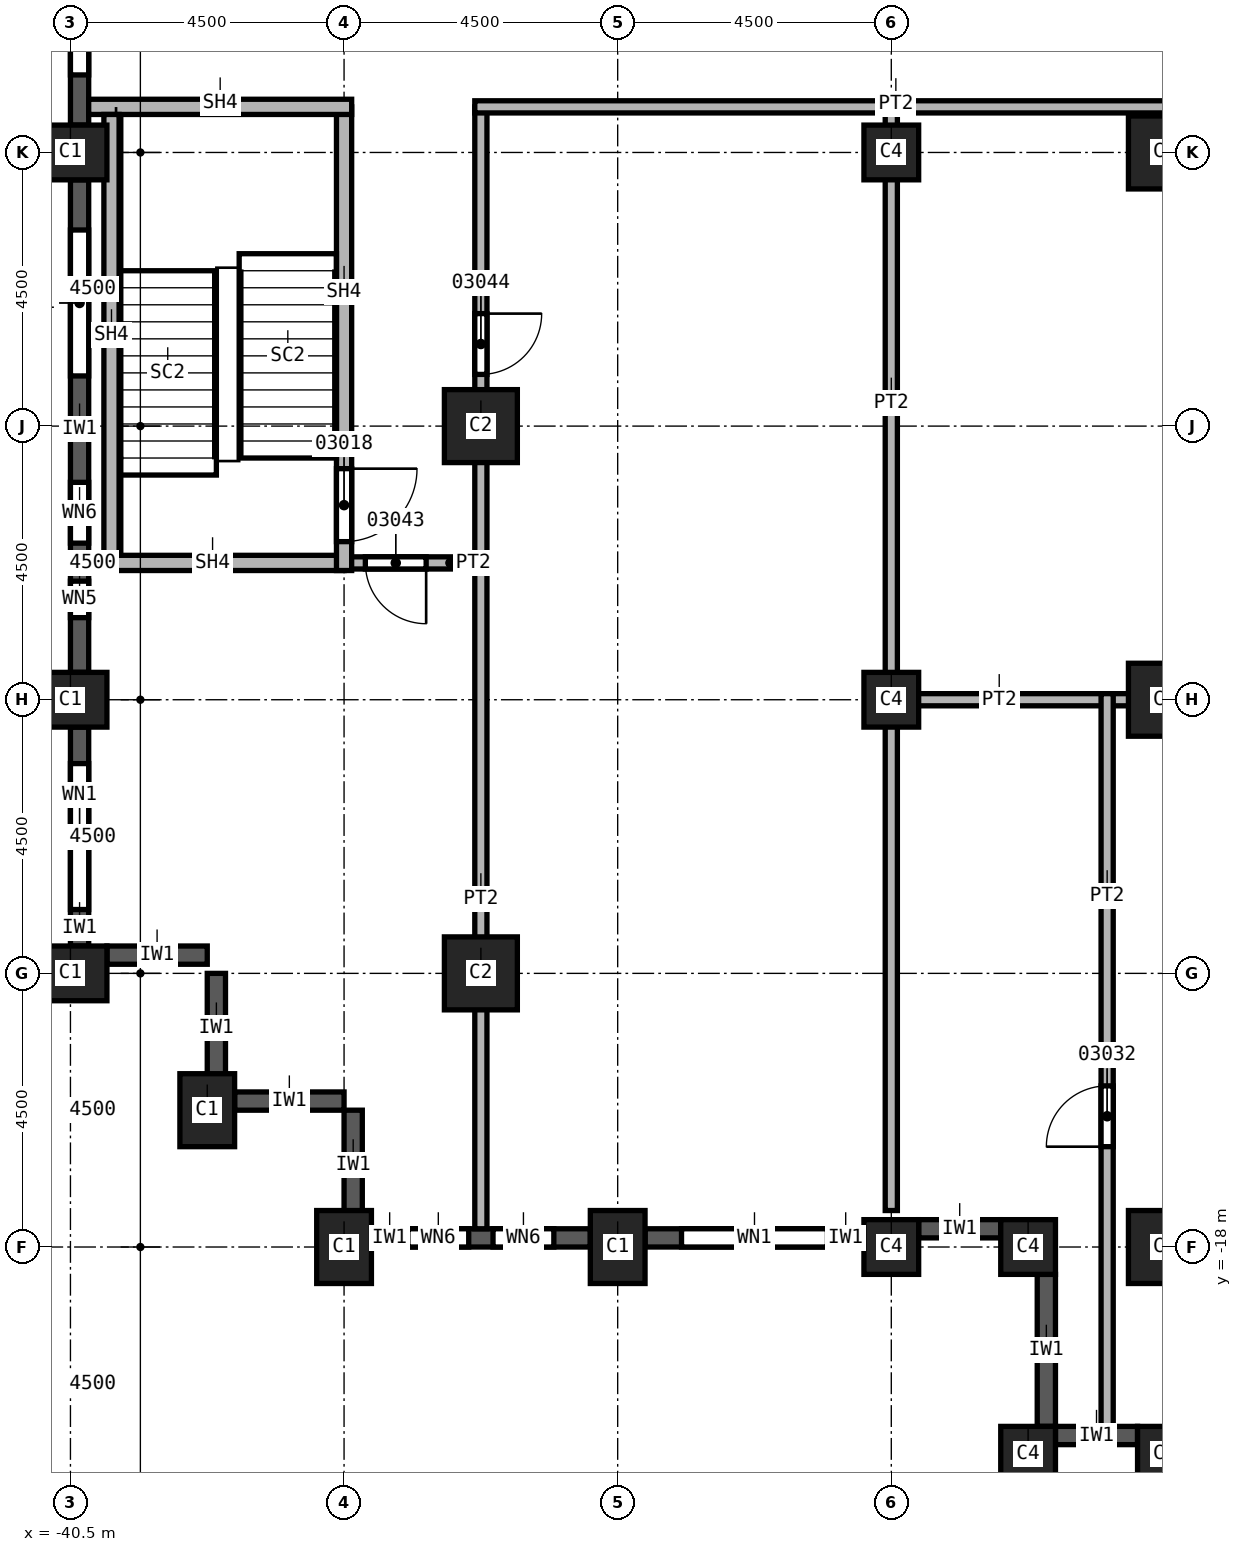
"""IFC4 building model, lengths in metres.
Left out: names, types, materials, properties, quantities, classifications, styles, units other than length and angle.
Written with IfcOpenShell. Run it as: python <this file> out.ifc"""

import sys

from ifc_helpers import new_model, si_unit, direction, frame, frame_2d, origin, origin_2d, place, context, subcontext, project, spatial, rectangle, extrude, element, fill, save


model = new_model("IFC4")
c1 = context("Model", 3, precision=1e-05, world=origin(), true_north=direction((0.0, 1.0)))
c2 = subcontext(c1, "Body", "Model", "MODEL_VIEW")
j1 = project(units=[si_unit("LENGTHUNIT", "METRE"), si_unit("PLANEANGLEUNIT", "RADIAN")], contexts=[c1])
p1 = place(None, origin())
s1 = spatial("IfcSite", under=j1, at=p1, CompositionType="ELEMENT")
p2 = place(p1, origin())
s2 = spatial("IfcBuilding", under=s1, at=p2, CompositionType="ELEMENT")
p3 = place(p2, frame((0.0, 0.0, 92.0)))
s3 = spatial("IfcBuildingStorey", under=s2, at=p3, CompositionType="ELEMENT", Elevation=92.0)
for number, where, z_axis, x_axis in (
    (1, (-40.5, 0.0, 0.0), (0.0, 0.0, 1.0), (0.0, 1.0, 0.0)),
    (2, (-40.5, -9.0, 0.0), (0.0, 0.0, 1.0), (0.0, 1.0, 0.0)),
    (3, (-40.5, -13.5, 0.0), (0.0, 0.0, 1.0), (0.0, 1.0, 0.0)),
    (4, (-38.25, -15.75, 0.0), (0.0, 0.0, 1.0), (1.0, 0.0, 0.0)),
    (5, (-31.5, -18.0, 0.0), (0.0, 0.0, 1.0), (1.0, 0.0, 0.0)),
    (6, (-36.0, -18.0, 0.0), (0.0, 0.0, 1.0), (1.0, 0.0, 0.0)),
):
    element("IfcColumn", number, at=place(p3, frame(where, z_axis=z_axis, x_axis=x_axis)), inside=s3, PredefinedType="COLUMN", context=c2, shape_type="SweptSolid", body=[
        extrude(rectangle(XDim=0.9, YDim=1.2, at=origin_2d()), origin(), (0.0, 0.0, 1.0), 3.7),
    ])
for number, where, z_axis, x_axis in (
    (7, (-33.75, -4.5, 0.0), (0.0, 0.0, 1.0), (1.0, 0.0, 0.0)),
    (8, (-33.75, -13.5, 0.0), (0.0, 0.0, 1.0), (1.0, 0.0, 0.0)),
    (9, (-22.5, 0.0, 0.0), (0.0, 0.0, 1.0), (1.0, 0.0, 0.0)),
    (10, (-22.5, -9.0, 0.0), (0.0, 0.0, 1.0), (1.0, 0.0, 0.0)),
    (11, (-22.5, -18.0, 0.0), (0.0, 0.0, 1.0), (1.0, 0.0, 0.0)),
):
    element("IfcColumn", number, at=place(p3, frame(where, z_axis=z_axis, x_axis=x_axis)), inside=s3, PredefinedType="COLUMN", context=c2, shape_type="SweptSolid", body=[
        extrude(rectangle(XDim=1.2, YDim=1.2, at=origin_2d()), origin(), (0.0, 0.0, 1.0), 3.7),
    ])
for number, where, z_axis, x_axis in (
    (12, (-27.0, 0.0, 0.0), (0.0, 0.0, 1.0), (1.0, 0.0, 0.0)),
    (13, (-27.0, -9.0, 0.0), (0.0, 0.0, 1.0), (1.0, 0.0, 0.0)),
    (14, (-27.0, -18.0, 0.0), (0.0, 0.0, 1.0), (1.0, 0.0, 0.0)),
    (15, (-22.5, -21.4, 0.0), (0.0, 0.0, 1.0), (1.0, 0.0, 0.0)),
    (16, (-24.75, -21.4, 0.0), (0.0, 0.0, 1.0), (1.0, 0.0, 0.0)),
    (17, (-24.75, -18.0, 0.0), (0.0, 0.0, 1.0), (1.0, 0.0, 0.0)),
):
    element("IfcColumn", number, at=place(p3, frame(where, z_axis=z_axis, x_axis=x_axis)), inside=s3, PredefinedType="COLUMN", context=c2, shape_type="SweptSolid", body=[
        extrude(rectangle(XDim=0.9, YDim=0.9, at=origin_2d()), origin(), (0.0, 0.0, 1.0), 3.7),
    ])
p4 = place(p3, frame((-39.9, -13.2, 0.0), z_axis=(0.0, 0.0, 1.0), x_axis=(1.0, 0.0, 0.0)))
e18 = element("IfcWall", 18, at=p4, inside=s3, PredefinedType="SOLIDWALL", context=c2, shape_type="SweptSolid", body=[
    extrude(rectangle(XDim=1.65, YDim=0.3, at=frame_2d((0.825, 0.0))), origin(), (0.0, 0.0, 1.0), 3.1),
])
for number, where, z_axis, x_axis in (
    (19, (-38.1, -15.3, 0.0), (0.0, 0.0, 1.0), (0.0, 1.0, 0.0)),
    (20, (-37.8, -15.6, 0.0), (0.0, 0.0, 1.0), (1.0, 0.0, 0.0)),
    (21, (-35.85, -17.55, 0.0), (0.0, 0.0, 1.0), (0.0, 1.0, 0.0)),
):
    element("IfcWall", number, at=place(p3, frame(where, z_axis=z_axis, x_axis=x_axis)), inside=s3, PredefinedType="SOLIDWALL", context=c2, shape_type="SweptSolid", body=[
        extrude(rectangle(XDim=1.8, YDim=0.3, at=frame_2d((0.9, 0.0))), origin(), (0.0, 0.0, 1.0), 3.1),
    ])
p5 = place(p3, frame((-40.35, 8.55, 0.0), z_axis=(0.0, 0.0, 1.0), x_axis=(0.0, -1.0, 0.0)))
e22 = element("IfcWall", 22, at=p5, inside=s3, PredefinedType="SOLIDWALL", context=c2, shape_type="SweptSolid", body=[
    extrude(rectangle(XDim=8.1, YDim=0.3, at=frame_2d((4.05, 0.0))), origin(), (0.0, 0.0, 1.0), 3.1),
])
p6 = place(p5, frame((0.825, 0.0, 0.8)))
e23 = element("IfcOpeningElement", 23, at=p6, cuts=e22, PredefinedType="OPENING", context=c2, shape_type="SweptSolid", body=[
    extrude(rectangle(XDim=2.4, YDim=1.95, at=frame_2d((1.2, 0.975))), frame((0.0, 0.15, 0.0), z_axis=(0.0, -1.0, 0.0), x_axis=(1.0, 0.0, 0.0)), (0.0, 0.0, 1.0), 0.3),
])
p7 = place(p5, frame((4.875, 0.0, 0.8)))
e24 = element("IfcOpeningElement", 24, at=p7, cuts=e22, PredefinedType="OPENING", context=c2, shape_type="SweptSolid", body=[
    extrude(rectangle(XDim=2.4, YDim=1.95, at=frame_2d((1.2, 0.975))), frame((0.0, 0.15, 0.0), z_axis=(0.0, -1.0, 0.0), x_axis=(1.0, 0.0, 0.0)), (0.0, 0.0, 1.0), 0.3),
])
p8 = place(p3, frame((-40.35, -0.45, 0.0), z_axis=(0.0, 0.0, 1.0), x_axis=(0.0, -1.0, 0.0)))
e25 = element("IfcWall", 25, at=p8, inside=s3, PredefinedType="SOLIDWALL", context=c2, shape_type="SweptSolid", body=[
    extrude(rectangle(XDim=8.1, YDim=0.3, at=frame_2d((4.05, 0.0))), origin(), (0.0, 0.0, 1.0), 3.1),
])
p9 = place(p8, frame((0.825, 0.0, 0.8)))
e26 = element("IfcOpeningElement", 26, at=p9, cuts=e25, PredefinedType="OPENING", context=c2, shape_type="SweptSolid", body=[
    extrude(rectangle(XDim=2.4, YDim=1.95, at=frame_2d((1.2, 0.975))), frame((0.0, 0.15, 0.0), z_axis=(0.0, -1.0, 0.0), x_axis=(1.0, 0.0, 0.0)), (0.0, 0.0, 1.0), 0.3),
])
p10 = place(p8, frame((4.975, 0.0, 0.8)))
e27 = element("IfcOpeningElement", 27, at=p10, cuts=e25, PredefinedType="OPENING", context=c2, shape_type="SweptSolid", body=[
    extrude(rectangle(XDim=1.0, YDim=1.95, at=frame_2d((0.5, 0.975))), frame((0.0, 0.15, 0.0), z_axis=(0.0, -1.0, 0.0), x_axis=(1.0, 0.0, 0.0)), (0.0, 0.0, 1.0), 0.3),
])
p11 = place(p8, frame((6.6, 0.0, 0.8)))
e28 = element("IfcOpeningElement", 28, at=p11, cuts=e25, PredefinedType="OPENING", context=c2, shape_type="SweptSolid", body=[
    extrude(rectangle(XDim=0.6, YDim=1.95, at=frame_2d((0.3, 0.975))), frame((0.0, 0.15, 0.0), z_axis=(0.0, -1.0, 0.0), x_axis=(1.0, 0.0, 0.0)), (0.0, 0.0, 1.0), 0.3),
])
p12 = place(p3, frame((-40.35, -9.45, 0.0), z_axis=(0.0, 0.0, 1.0), x_axis=(0.0, -1.0, 0.0)))
e29 = element("IfcWall", 29, at=p12, inside=s3, PredefinedType="SOLIDWALL", context=c2, shape_type="SweptSolid", body=[
    extrude(rectangle(XDim=3.6, YDim=0.3, at=frame_2d((1.8, 0.0))), origin(), (0.0, 0.0, 1.0), 3.1),
])
p13 = place(p12, frame((0.6, 0.0, 0.8)))
e30 = element("IfcOpeningElement", 30, at=p13, cuts=e29, PredefinedType="OPENING", context=c2, shape_type="SweptSolid", body=[
    extrude(rectangle(XDim=2.4, YDim=1.95, at=frame_2d((1.2, 0.975))), frame((0.0, 0.15, 0.0), z_axis=(0.0, -1.0, 0.0), x_axis=(1.0, 0.0, 0.0)), (0.0, 0.0, 1.0), 0.3),
])
p14 = place(p3, frame((-35.55, -17.85, 0.0), z_axis=(0.0, 0.0, 1.0), x_axis=(1.0, 0.0, 0.0)))
e31 = element("IfcWall", 31, at=p14, inside=s3, PredefinedType="SOLIDWALL", context=c2, shape_type="SweptSolid", body=[
    extrude(rectangle(XDim=3.6, YDim=0.3, at=frame_2d((1.8, 0.0))), origin(), (0.0, 0.0, 1.0), 3.1),
])
p15 = place(p14, frame((0.6, 0.0, 0.8)))
e32 = element("IfcOpeningElement", 32, at=p15, cuts=e31, PredefinedType="OPENING", context=c2, shape_type="SweptSolid", body=[
    extrude(rectangle(XDim=1.0, YDim=1.95, at=frame_2d((0.5, 0.975))), frame((0.0, 0.15, 0.0), z_axis=(0.0, -1.0, 0.0), x_axis=(1.0, 0.0, 0.0)), (0.0, 0.0, 1.0), 0.3),
])
p16 = place(p14, frame((2.0, 0.0, 0.8)))
e33 = element("IfcOpeningElement", 33, at=p16, cuts=e31, PredefinedType="OPENING", context=c2, shape_type="SweptSolid", body=[
    extrude(rectangle(XDim=1.0, YDim=1.95, at=frame_2d((0.5, 0.975))), frame((0.0, 0.15, 0.0), z_axis=(0.0, -1.0, 0.0), x_axis=(1.0, 0.0, 0.0)), (0.0, 0.0, 1.0), 0.3),
])
p17 = place(p3, frame((-31.05, -17.85, 0.0), z_axis=(0.0, 0.0, 1.0), x_axis=(1.0, 0.0, 0.0)))
e34 = element("IfcWall", 34, at=p17, inside=s3, PredefinedType="SOLIDWALL", context=c2, shape_type="SweptSolid", body=[
    extrude(rectangle(XDim=3.6, YDim=0.3, at=frame_2d((1.8, 0.0))), origin(), (0.0, 0.0, 1.0), 3.1),
])
p18 = place(p17, frame((0.6, 0.0, 0.8)))
e35 = element("IfcOpeningElement", 35, at=p18, cuts=e34, PredefinedType="OPENING", context=c2, shape_type="SweptSolid", body=[
    extrude(rectangle(XDim=2.4, YDim=1.95, at=frame_2d((1.2, 0.975))), frame((0.0, 0.15, 0.0), z_axis=(0.0, -1.0, 0.0), x_axis=(1.0, 0.0, 0.0)), (0.0, 0.0, 1.0), 0.3),
])
p19 = place(p3, frame((-26.55, -17.7, 0.0), z_axis=(0.0, 0.0, 1.0), x_axis=(1.0, 0.0, 0.0)))
e36 = element("IfcWall", 36, at=p19, inside=s3, PredefinedType="SOLIDWALL", context=c2, shape_type="SweptSolid", body=[
    extrude(rectangle(XDim=1.35, YDim=0.3, at=frame_2d((0.675, 0.0))), origin(), (0.0, 0.0, 1.0), 3.1),
])
p20 = place(p3, frame((-24.45, -18.45, 0.0), z_axis=(0.0, 0.0, 1.0), x_axis=(0.0, -1.0, 0.0)))
e37 = element("IfcWall", 37, at=p20, inside=s3, PredefinedType="SOLIDWALL", context=c2, shape_type="SweptSolid", body=[
    extrude(rectangle(XDim=2.5, YDim=0.3, at=frame_2d((1.25, 0.0))), origin(), (0.0, 0.0, 1.0), 3.1),
])
p21 = place(p3, frame((-24.3, -21.1, 0.0), z_axis=(0.0, 0.0, 1.0), x_axis=(1.0, 0.0, 0.0)))
e38 = element("IfcWall", 38, at=p21, inside=s3, PredefinedType="SOLIDWALL", context=c2, shape_type="SweptSolid", body=[
    extrude(rectangle(XDim=1.35, YDim=0.3, at=frame_2d((0.675, 0.0))), origin(), (0.0, 0.0, 1.0), 3.1),
])
p22 = place(p3, frame((-33.75, 0.75, 0.0), z_axis=(0.0, 0.0, 1.0), x_axis=(0.0, -1.0, 0.0)))
e39 = element("IfcWall", 39, at=p22, inside=s3, PredefinedType="PARTITIONING", context=c2, shape_type="SweptSolid", body=[
    extrude(rectangle(XDim=18.45, YDim=0.2, at=frame_2d((9.225, 0.0))), origin(), (0.0, 0.0, 1.0), 3.7),
])
p23 = place(p22, frame((3.4, 0.0, 0.0)))
e40 = element("IfcOpeningElement", 40, at=p23, cuts=e39, PredefinedType="OPENING", context=c2, shape_type="SweptSolid", body=[
    extrude(rectangle(XDim=1.0, YDim=2.1, at=frame_2d((0.5, 1.05))), frame((0.0, 0.1, 0.0), z_axis=(0.0, -1.0, 0.0), x_axis=(1.0, 0.0, 0.0)), (0.0, 0.0, 1.0), 0.2),
])
p24 = place(p3, frame((-33.65, -6.75, 0.0), z_axis=(0.0, 0.0, 1.0), x_axis=(-1.0, 0.0, 0.0)))
e41 = element("IfcWall", 41, at=p24, inside=s3, PredefinedType="PARTITIONING", context=c2, shape_type="SweptSolid", body=[
    extrude(rectangle(XDim=2.35, YDim=0.2, at=frame_2d((1.175, 0.0))), origin(), (0.0, 0.0, 1.0), 3.7),
])
p25 = place(p24, frame((1.0, 0.0, 0.0)))
e42 = element("IfcOpeningElement", 42, at=p25, cuts=e41, PredefinedType="OPENING", context=c2, shape_type="SweptSolid", body=[
    extrude(rectangle(XDim=1.0, YDim=2.1, at=frame_2d((0.5, 1.05))), frame((0.0, 0.1, 0.0), z_axis=(0.0, -1.0, 0.0), x_axis=(1.0, 0.0, 0.0)), (0.0, 0.0, 1.0), 0.2),
])
p26 = place(p3, frame((-27.1, -9.0, 0.0), z_axis=(0.0, 0.0, 1.0), x_axis=(1.0, 0.0, 0.0)))
e43 = element("IfcWall", 43, at=p26, inside=s3, PredefinedType="PARTITIONING", context=c2, shape_type="SweptSolid", body=[
    extrude(rectangle(XDim=7.2, YDim=0.2, at=frame_2d((3.6, 0.0))), origin(), (0.0, 0.0, 1.0), 3.7),
])
p27 = place(p3, frame((-27.0, -17.4, 0.0), z_axis=(0.0, 0.0, 1.0), x_axis=(0.0, 1.0, 0.0)))
e44 = element("IfcWall", 44, at=p27, inside=s3, PredefinedType="PARTITIONING", context=c2, shape_type="SweptSolid", body=[
    extrude(rectangle(XDim=18.15, YDim=0.2, at=frame_2d((9.075, 0.0))), origin(), (0.0, 0.0, 1.0), 3.7),
])
p28 = place(p3, frame((-19.9, 0.75, 0.0), z_axis=(0.0, 0.0, 1.0), x_axis=(-1.0, 0.0, 0.0)))
e45 = element("IfcWall", 45, at=p28, inside=s3, PredefinedType="PARTITIONING", context=c2, shape_type="SweptSolid", body=[
    extrude(rectangle(XDim=13.95, YDim=0.2, at=frame_2d((6.975, 0.0))), origin(), (0.0, 0.0, 1.0), 3.7),
])
p29 = place(p3, frame((-23.45, -20.95, 0.0), z_axis=(0.0, 0.0, 1.0), x_axis=(0.0, 1.0, 0.0)))
e46 = element("IfcWall", 46, at=p29, inside=s3, PredefinedType="PARTITIONING", context=c2, shape_type="SweptSolid", body=[
    extrude(rectangle(XDim=12.05, YDim=0.2, at=frame_2d((6.025, 0.0))), origin(), (0.0, 0.0, 1.0), 3.7),
])
p30 = place(p29, frame((4.6, 0.0, 0.0)))
e47 = element("IfcOpeningElement", 47, at=p30, cuts=e46, PredefinedType="OPENING", context=c2, shape_type="SweptSolid", body=[
    extrude(rectangle(XDim=1.0, YDim=2.1, at=frame_2d((0.5, 1.05))), frame((0.0, 0.1, 0.0), z_axis=(0.0, -1.0, 0.0), x_axis=(1.0, 0.0, 0.0)), (0.0, 0.0, 1.0), 0.2),
])
p31 = place(p3, frame((-36.0, -6.75, 0.0), z_axis=(0.0, 0.0, 1.0), x_axis=(-1.0, 0.0, 0.0)))
e48 = element("IfcWall", 48, at=p31, inside=s3, PredefinedType="SOLIDWALL", context=c2, shape_type="SweptSolid", body=[
    extrude(rectangle(XDim=4.2, YDim=0.25, at=frame_2d((2.1, 0.0))), origin(), (0.0, 0.0, 1.0), 3.7),
])
p32 = place(p3, frame((-36.0, 0.75, 0.0), z_axis=(0.0, 0.0, 1.0), x_axis=(0.0, -1.0, 0.0)))
e49 = element("IfcWall", 49, at=p32, inside=s3, PredefinedType="SOLIDWALL", context=c2, shape_type="SweptSolid", body=[
    extrude(rectangle(XDim=7.625, YDim=0.25, at=frame_2d((3.812, 0.0))), origin(), (0.0, 0.0, 1.0), 3.7),
])
p33 = place(p32, frame((5.95, 0.0, 0.0)))
e50 = element("IfcOpeningElement", 50, at=p33, cuts=e49, PredefinedType="OPENING", context=c2, shape_type="SweptSolid", body=[
    extrude(rectangle(XDim=1.2, YDim=2.1, at=frame_2d((0.6, 1.05))), frame((0.0, 0.125, 0.0), z_axis=(0.0, -1.0, 0.0), x_axis=(1.0, 0.0, 0.0)), (0.0, 0.0, 1.0), 0.25),
])
p34 = place(p3, frame((-35.875, 0.75, 0.0), z_axis=(0.0, 0.0, 1.0), x_axis=(-1.0, 0.0, 0.0)))
e51 = element("IfcWall", 51, at=p34, inside=s3, PredefinedType="SOLIDWALL", context=c2, shape_type="SweptSolid", body=[
    extrude(rectangle(XDim=4.325, YDim=0.25, at=frame_2d((2.163, 0.0))), origin(), (0.0, 0.0, 1.0), 3.7),
])
p35 = place(p3, frame((-39.825, -6.625, 0.0), z_axis=(0.0, 0.0, 1.0), x_axis=(0.0, 1.0, 0.0)))
e52 = element("IfcWall", 52, at=p35, inside=s3, PredefinedType="SOLIDWALL", context=c2, shape_type="SweptSolid", body=[
    extrude(rectangle(XDim=7.25, YDim=0.25, at=frame_2d((3.625, 0.0))), origin(), (0.0, 0.0, 1.0), 3.7),
])
p36 = place(p7, origin())
e53 = element("IfcWindow", 53, at=p36, inside=s3, PartitioningType="SINGLE_PANEL", PredefinedType="WINDOW", context=c2, shape_type="SweptSolid", body=[
    extrude(rectangle(XDim=2.4, YDim=1.95, at=frame_2d((1.2, 0.975))), frame((0.0, 0.03, 0.0), z_axis=(0.0, -1.0, 0.0), x_axis=(1.0, 0.0, 0.0)), (0.0, 0.0, 1.0), 0.06),
])
fill(e24, e53)
p37 = place(p9, origin())
e54 = element("IfcWindow", 54, at=p37, inside=s3, PartitioningType="SINGLE_PANEL", PredefinedType="WINDOW", context=c2, shape_type="SweptSolid", body=[
    extrude(rectangle(XDim=2.4, YDim=1.95, at=frame_2d((1.2, 0.975))), frame((0.0, 0.03, 0.0), z_axis=(0.0, -1.0, 0.0), x_axis=(1.0, 0.0, 0.0)), (0.0, 0.0, 1.0), 0.06),
])
fill(e26, e54)
p38 = place(p13, origin())
e55 = element("IfcWindow", 55, at=p38, inside=s3, PartitioningType="SINGLE_PANEL", PredefinedType="WINDOW", context=c2, shape_type="SweptSolid", body=[
    extrude(rectangle(XDim=2.4, YDim=1.95, at=frame_2d((1.2, 0.975))), frame((0.0, 0.03, 0.0), z_axis=(0.0, -1.0, 0.0), x_axis=(1.0, 0.0, 0.0)), (0.0, 0.0, 1.0), 0.06),
])
fill(e30, e55)
p39 = place(p18, origin())
e56 = element("IfcWindow", 56, at=p39, inside=s3, PartitioningType="SINGLE_PANEL", PredefinedType="WINDOW", context=c2, shape_type="SweptSolid", body=[
    extrude(rectangle(XDim=2.4, YDim=1.95, at=frame_2d((1.2, 0.975))), frame((0.0, 0.03, 0.0), z_axis=(0.0, -1.0, 0.0), x_axis=(1.0, 0.0, 0.0)), (0.0, 0.0, 1.0), 0.06),
])
fill(e35, e56)
p40 = place(p33, origin())
e57 = element("IfcDoor", 57, at=p40, inside=s3, OperationType="SINGLE_SWING_LEFT", PredefinedType="DOOR", context=c2, shape_type="SweptSolid", body=[
    extrude(rectangle(XDim=1.2, YDim=2.1, at=frame_2d((0.6, 1.05))), frame((0.0, 0.025, 0.0), z_axis=(0.0, -1.0, 0.0), x_axis=(1.0, 0.0, 0.0)), (0.0, 0.0, 1.0), 0.05),
])
fill(e50, e57)
p41 = place(p30, origin())
e58 = element("IfcDoor", 58, at=p41, inside=s3, OperationType="SINGLE_SWING_LEFT", PredefinedType="DOOR", context=c2, shape_type="SweptSolid", body=[
    extrude(rectangle(XDim=1.0, YDim=2.1, at=frame_2d((0.5, 1.05))), frame((0.0, 0.025, 0.0), z_axis=(0.0, -1.0, 0.0), x_axis=(1.0, 0.0, 0.0)), (0.0, 0.0, 1.0), 0.05),
])
fill(e47, e58)
p42 = place(p25, origin())
e59 = element("IfcDoor", 59, at=p42, inside=s3, OperationType="SINGLE_SWING_RIGHT", PredefinedType="DOOR", context=c2, shape_type="SweptSolid", body=[
    extrude(rectangle(XDim=1.0, YDim=2.1, at=frame_2d((0.5, 1.05))), frame((0.0, 0.025, 0.0), z_axis=(0.0, -1.0, 0.0), x_axis=(1.0, 0.0, 0.0)), (0.0, 0.0, 1.0), 0.05),
])
fill(e42, e59)
p43 = place(p23, origin())
e60 = element("IfcDoor", 60, at=p43, inside=s3, OperationType="SINGLE_SWING_LEFT", PredefinedType="DOOR", context=c2, shape_type="SweptSolid", body=[
    extrude(rectangle(XDim=1.0, YDim=2.1, at=frame_2d((0.5, 1.05))), frame((0.0, 0.025, 0.0), z_axis=(0.0, -1.0, 0.0), x_axis=(1.0, 0.0, 0.0)), (0.0, 0.0, 1.0), 0.05),
])
fill(e40, e60)
p44 = place(p10, origin())
e61 = element("IfcWindow", 61, at=p44, inside=s3, PartitioningType="SINGLE_PANEL", PredefinedType="WINDOW", context=c2, shape_type="SweptSolid", body=[
    extrude(rectangle(XDim=1.0, YDim=1.95, at=frame_2d((0.5, 0.975))), frame((0.0, 0.03, 0.0), z_axis=(0.0, -1.0, 0.0), x_axis=(1.0, 0.0, 0.0)), (0.0, 0.0, 1.0), 0.06),
])
fill(e27, e61)
p45 = place(p11, origin())
e62 = element("IfcWindow", 62, at=p45, inside=s3, PartitioningType="SINGLE_PANEL", PredefinedType="WINDOW", context=c2, shape_type="SweptSolid", body=[
    extrude(rectangle(XDim=0.6, YDim=1.95, at=frame_2d((0.3, 0.975))), frame((0.0, 0.03, 0.0), z_axis=(0.0, -1.0, 0.0), x_axis=(1.0, 0.0, 0.0)), (0.0, 0.0, 1.0), 0.06),
])
fill(e28, e62)
p46 = place(p15, origin())
e63 = element("IfcWindow", 63, at=p46, inside=s3, PartitioningType="SINGLE_PANEL", PredefinedType="WINDOW", context=c2, shape_type="SweptSolid", body=[
    extrude(rectangle(XDim=1.0, YDim=1.95, at=frame_2d((0.5, 0.975))), frame((0.0, 0.03, 0.0), z_axis=(0.0, -1.0, 0.0), x_axis=(1.0, 0.0, 0.0)), (0.0, 0.0, 1.0), 0.06),
])
fill(e32, e63)
p47 = place(p16, origin())
e64 = element("IfcWindow", 64, at=p47, inside=s3, PartitioningType="SINGLE_PANEL", PredefinedType="WINDOW", context=c2, shape_type="SweptSolid", body=[
    extrude(rectangle(XDim=1.0, YDim=1.95, at=frame_2d((0.5, 0.975))), frame((0.0, 0.03, 0.0), z_axis=(0.0, -1.0, 0.0), x_axis=(1.0, 0.0, 0.0)), (0.0, 0.0, 1.0), 0.06),
])
fill(e33, e64)
save(model, sys.argv[1])
